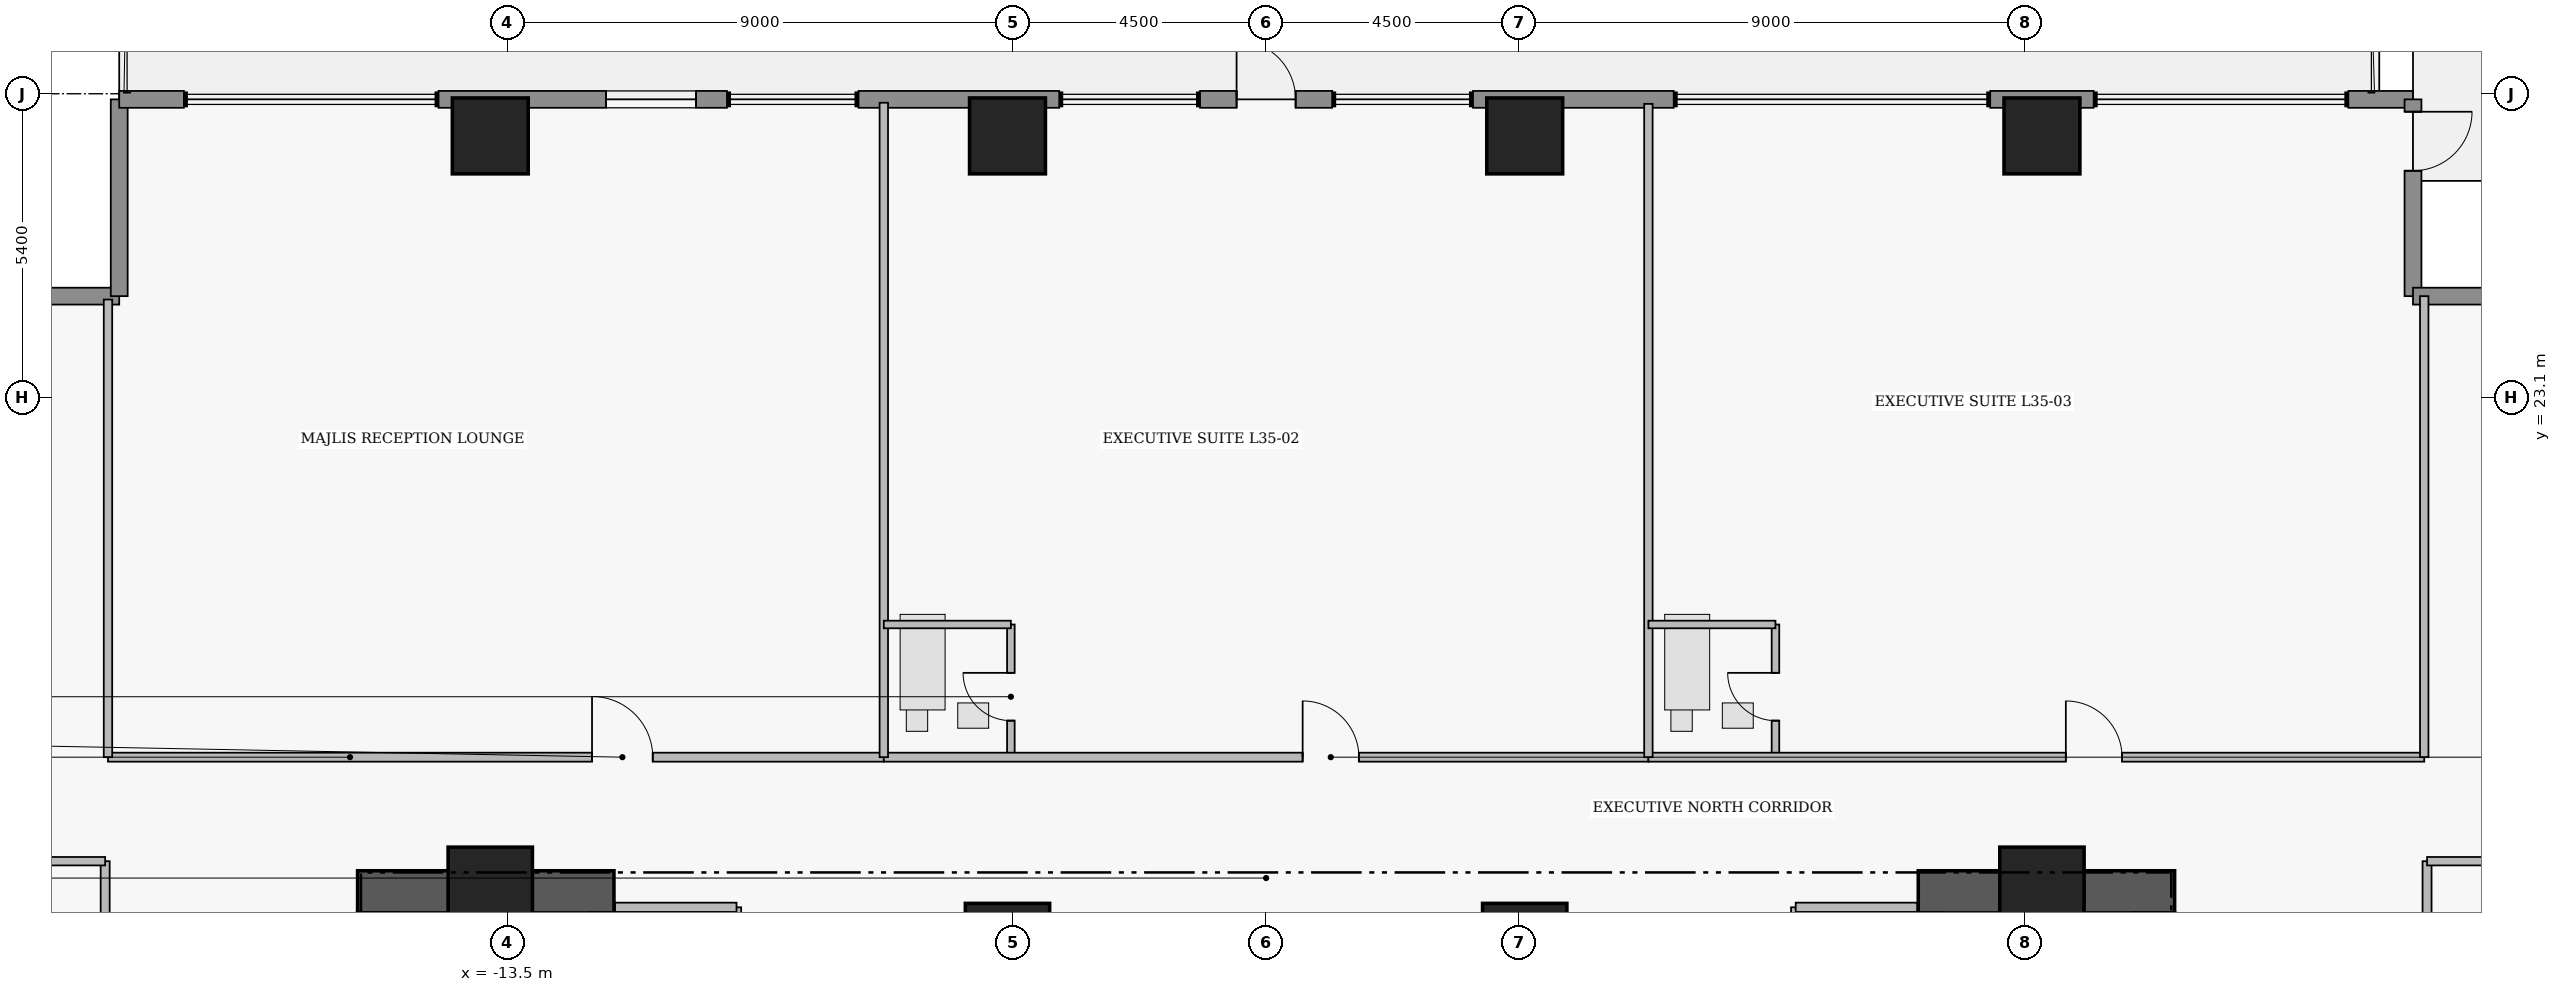
"""IFC4 building model, lengths in metres.
Left out: names, types, materials, properties, quantities, classifications, styles, units other than length and angle.
Written with IfcOpenShell. Run it as: python <this file> out.ifc"""

import sys

from ifc_helpers import new_model, si_unit, direction, frame, frame_2d, origin, origin_2d, place, context, subcontext, project, spatial, rectangle, extrude, element, fill, save


model = new_model("IFC4")
c1 = context("Model", 3, precision=1e-05, world=origin(), true_north=direction((0.0, 1.0)))
c2 = subcontext(c1, "Body", "Model", "MODEL_VIEW")
j1 = project(units=[si_unit("LENGTHUNIT", "METRE"), si_unit("PLANEANGLEUNIT", "RADIAN")], contexts=[c1])
p1 = place(None, origin())
s1 = spatial("IfcSite", under=j1, at=p1, CompositionType="ELEMENT")
p2 = place(p1, origin())
s2 = spatial("IfcBuilding", under=s1, at=p2, CompositionType="ELEMENT")
p3 = place(p2, frame((0.0, 0.0, 139.45)))
s3 = spatial("IfcBuildingStorey", under=s2, at=p3, CompositionType="ELEMENT", Elevation=139.45)
for number, where, z_axis, x_axis in (
    (1, (-16.16, 14.305, 0.0), (0.0, 0.0, 1.0), (1.0, 0.0, 0.0)),
    (2, (11.6, 14.305, 0.0), (0.0, 0.0, 1.0), (1.0, 0.0, 0.0)),
):
    element("IfcWall", number, at=place(p3, frame(where, z_axis=z_axis, x_axis=x_axis)), inside=s3, PredefinedType="SHEAR", context=c2, shape_type="SweptSolid", body=[
        extrude(rectangle(XDim=4.56, YDim=0.75, at=frame_2d((2.28, 0.0))), origin(), (0.0, 0.0, 1.0), 3.46),
    ])
for number, where, z_axis, x_axis in (
    (3, (-13.8, 14.35, 0.0), (0.0, 0.0, 1.0), (1.0, 0.0, 0.0)),
    (4, (-4.6, 13.35, 0.0), (0.0, 0.0, 1.0), (1.0, 0.0, 0.0)),
    (5, (4.6, 13.35, 0.0), (0.0, 0.0, 1.0), (1.0, 0.0, 0.0)),
    (6, (13.8, 14.35, 0.0), (0.0, 0.0, 1.0), (1.0, 0.0, 0.0)),
):
    element("IfcColumn", number, at=place(p3, frame(where, z_axis=z_axis, x_axis=x_axis)), inside=s3, PredefinedType="COLUMN", context=c2, shape_type="SweptSolid", body=[
        extrude(rectangle(XDim=1.5, YDim=1.5, at=origin_2d()), origin(), (0.0, 0.0, 1.0), 3.65),
    ])
for number, where, z_axis, x_axis in (
    (7, (-13.8, 27.75, 0.0), (0.0, 0.0, 1.0), (1.0, 0.0, 0.0)),
    (8, (-4.6, 27.75, 0.0), (0.0, 0.0, 1.0), (1.0, 0.0, 0.0)),
    (9, (4.6, 27.75, 0.0), (0.0, 0.0, 1.0), (1.0, 0.0, 0.0)),
    (10, (13.8, 27.75, 0.0), (0.0, 0.0, 1.0), (1.0, 0.0, 0.0)),
):
    element("IfcColumn", number, at=place(p3, frame(where, z_axis=z_axis, x_axis=x_axis)), inside=s3, PredefinedType="COLUMN", context=c2, shape_type="SweptSolid", body=[
        extrude(rectangle(XDim=1.35, YDim=1.35, at=origin_2d()), origin(), (0.0, 0.0, 1.0), 3.65),
    ])
for number, where, z_axis, x_axis in (
    (11, (-23.9, 24.9, 0.0), (0.0, 0.0, 1.0), (1.0, 0.0, 0.0)),
    (12, (-20.4, 24.9, 0.0), (0.0, 0.0, 1.0), (0.0, 1.0, 0.0)),
):
    element("IfcWall", number, at=place(p3, frame(where, z_axis=z_axis, x_axis=x_axis)), inside=s3, PredefinedType="STANDARD", context=c2, shape_type="SweptSolid", body=[
        extrude(rectangle(XDim=3.5, YDim=0.3, at=frame_2d((1.75, 0.0))), origin(), (0.0, 0.0, 1.0), 3.43),
    ])
p4 = place(p3, frame((-20.4, 28.4, 0.0), z_axis=(0.0, 0.0, 1.0), x_axis=(1.0, 0.0, 0.0)))
e13 = element("IfcWall", 13, at=p4, inside=s3, PredefinedType="STANDARD", context=c2, shape_type="SweptSolid", body=[
    extrude(rectangle(XDim=1.15, YDim=0.3, at=frame_2d((0.575, 0.0))), origin(), (0.0, 0.0, 1.0), 3.43),
])
p5 = place(p3, frame((-14.72, 28.4, 0.0), z_axis=(0.0, 0.0, 1.0), x_axis=(1.0, 0.0, 0.0)))
e14 = element("IfcWall", 14, at=p5, inside=s3, PredefinedType="STANDARD", context=c2, shape_type="SweptSolid", body=[
    extrude(rectangle(XDim=5.13, YDim=0.3, at=frame_2d((2.565, 0.0))), origin(), (0.0, 0.0, 1.0), 3.43),
])
p6 = place(p5, frame((2.98, 0.0, 0.85)))
e15 = element("IfcOpeningElement", 15, at=p6, cuts=e14, PredefinedType="OPENING", context=c2, shape_type="SweptSolid", body=[
    extrude(rectangle(XDim=1.6, YDim=1.8, at=frame_2d((0.8, 0.9))), frame((0.0, 0.16, 0.0), z_axis=(0.0, -1.0, 0.0), x_axis=(1.0, 0.0, 0.0)), (0.0, 0.0, 1.0), 0.32),
])
p7 = place(p3, frame((-7.25, 28.4, 0.0), z_axis=(0.0, 0.0, 1.0), x_axis=(1.0, 0.0, 0.0)))
e16 = element("IfcWall", 16, at=p7, inside=s3, PredefinedType="STANDARD", context=c2, shape_type="SweptSolid", body=[
    extrude(rectangle(XDim=3.57, YDim=0.3, at=frame_2d((1.785, 0.0))), origin(), (0.0, 0.0, 1.0), 3.43),
])
p8 = place(p3, frame((-1.175, 28.4, 0.0), z_axis=(0.0, 0.0, 1.0), x_axis=(1.0, 0.0, 0.0)))
e17 = element("IfcWall", 17, at=p8, inside=s3, PredefinedType="STANDARD", context=c2, shape_type="SweptSolid", body=[
    extrude(rectangle(XDim=2.35, YDim=0.3, at=frame_2d((1.175, 0.0))), origin(), (0.0, 0.0, 1.0), 3.43),
])
p9 = place(p8, frame((0.65, 0.0, 0.0)))
e18 = element("IfcOpeningElement", 18, at=p9, cuts=e17, PredefinedType="OPENING", context=c2, shape_type="SweptSolid", body=[
    extrude(rectangle(XDim=1.05, YDim=2.2, at=frame_2d((0.525, 1.1))), frame((0.0, 0.16, 0.0), z_axis=(0.0, -1.0, 0.0), x_axis=(1.0, 0.0, 0.0)), (0.0, 0.0, 1.0), 0.32),
])
p10 = place(p3, frame((3.68, 28.4, 0.0), z_axis=(0.0, 0.0, 1.0), x_axis=(1.0, 0.0, 0.0)))
e19 = element("IfcWall", 19, at=p10, inside=s3, PredefinedType="STANDARD", context=c2, shape_type="SweptSolid", body=[
    extrude(rectangle(XDim=3.57, YDim=0.3, at=frame_2d((1.785, 0.0))), origin(), (0.0, 0.0, 1.0), 3.43),
])
p11 = place(p3, frame((12.88, 28.4, 0.0), z_axis=(0.0, 0.0, 1.0), x_axis=(1.0, 0.0, 0.0)))
e20 = element("IfcWall", 20, at=p11, inside=s3, PredefinedType="STANDARD", context=c2, shape_type="SweptSolid", body=[
    extrude(rectangle(XDim=1.84, YDim=0.3, at=frame_2d((0.92, 0.0))), origin(), (0.0, 0.0, 1.0), 3.43),
])
p12 = place(p3, frame((19.25, 28.4, 0.0), z_axis=(0.0, 0.0, 1.0), x_axis=(1.0, 0.0, 0.0)))
e21 = element("IfcWall", 21, at=p12, inside=s3, PredefinedType="STANDARD", context=c2, shape_type="SweptSolid", body=[
    extrude(rectangle(XDim=1.15, YDim=0.3, at=frame_2d((0.575, 0.0))), origin(), (0.0, 0.0, 1.0), 3.43),
])
p13 = place(p3, frame((20.4, 28.4, 0.0), z_axis=(0.0, 0.0, 1.0), x_axis=(0.0, -1.0, 0.0)))
e22 = element("IfcWall", 22, at=p13, inside=s3, PredefinedType="STANDARD", context=c2, shape_type="SweptSolid", body=[
    extrude(rectangle(XDim=3.5, YDim=0.3, at=frame_2d((1.75, 0.0))), origin(), (0.0, 0.0, 1.0), 3.43),
])
p14 = place(p13, frame((0.22, 0.0, 0.0)))
e23 = element("IfcOpeningElement", 23, at=p14, cuts=e22, PredefinedType="OPENING", context=c2, shape_type="SweptSolid", body=[
    extrude(rectangle(XDim=1.05, YDim=2.2, at=frame_2d((0.525, 1.1))), frame((0.0, 0.16, 0.0), z_axis=(0.0, -1.0, 0.0), x_axis=(1.0, 0.0, 0.0)), (0.0, 0.0, 1.0), 0.32),
])
p15 = place(p3, frame((20.4, 24.9, 0.0), z_axis=(0.0, 0.0, 1.0), x_axis=(1.0, 0.0, 0.0)))
e24 = element("IfcWall", 24, at=p15, inside=s3, PredefinedType="STANDARD", context=c2, shape_type="SweptSolid", body=[
    extrude(rectangle(XDim=3.5, YDim=0.3, at=frame_2d((1.75, 0.0))), origin(), (0.0, 0.0, 1.0), 3.43),
])
p16 = place(p3, frame((-20.6, 16.7, 0.0), z_axis=(0.0, 0.0, 1.0), x_axis=(1.0, 0.0, 0.0)))
e25 = element("IfcWall", 25, at=p16, inside=s3, PredefinedType="PARTITIONING", context=c2, shape_type="SweptSolid", body=[
    extrude(rectangle(XDim=13.8, YDim=0.16, at=frame_2d((6.9, 0.0))), origin(), (0.0, 0.0, 1.0), 2.973),
])
p17 = place(p16, frame((8.61, 0.0, 0.0)))
e26 = element("IfcOpeningElement", 26, at=p17, cuts=e25, PredefinedType="OPENING", context=c2, shape_type="SweptSolid", body=[
    extrude(rectangle(XDim=1.08, YDim=2.18, at=frame_2d((0.54, 1.09))), frame((0.0, 0.09, 0.0), z_axis=(0.0, -1.0, 0.0), x_axis=(1.0, 0.0, 0.0)), (0.0, 0.0, 1.0), 0.18),
])
p18 = place(p3, frame((-4.54, 16.7, 0.0), z_axis=(0.0, 0.0, 1.0), x_axis=(0.0, 1.0, 0.0)))
e27 = element("IfcWall", 27, at=p18, inside=s3, PredefinedType="PLUMBINGWALL", context=c2, shape_type="SweptSolid", body=[
    extrude(rectangle(XDim=2.36, YDim=0.135, at=frame_2d((1.18, 0.0))), origin(), (0.0, 0.0, 1.0), 2.503),
])
p19 = place(p18, frame((0.65, 0.0, 0.0)))
e28 = element("IfcOpeningElement", 28, at=p19, cuts=e27, PredefinedType="OPENING", context=c2, shape_type="SweptSolid", body=[
    extrude(rectangle(XDim=0.85, YDim=2.1, at=frame_2d((0.425, 1.05))), frame((0.0, 0.077, 0.0), z_axis=(0.0, -1.0, 0.0), x_axis=(1.0, 0.0, 0.0)), (0.0, 0.0, 1.0), 0.155),
])
p20 = place(p3, frame((-6.8, 16.7, 0.0), z_axis=(0.0, 0.0, 1.0), x_axis=(1.0, 0.0, 0.0)))
e29 = element("IfcWall", 29, at=p20, inside=s3, PredefinedType="PARTITIONING", context=c2, shape_type="SweptSolid", body=[
    extrude(rectangle(XDim=13.6, YDim=0.16, at=frame_2d((6.8, 0.0))), origin(), (0.0, 0.0, 1.0), 2.973),
])
p21 = place(p20, frame((7.45, 0.0, 0.0)))
e30 = element("IfcOpeningElement", 30, at=p21, cuts=e29, PredefinedType="OPENING", context=c2, shape_type="SweptSolid", body=[
    extrude(rectangle(XDim=1.0, YDim=2.15, at=frame_2d((0.5, 1.075))), frame((0.0, 0.09, 0.0), z_axis=(0.0, -1.0, 0.0), x_axis=(1.0, 0.0, 0.0)), (0.0, 0.0, 1.0), 0.18),
])
p22 = place(p3, frame((9.06, 16.7, 0.0), z_axis=(0.0, 0.0, 1.0), x_axis=(0.0, 1.0, 0.0)))
e31 = element("IfcWall", 31, at=p22, inside=s3, PredefinedType="PLUMBINGWALL", context=c2, shape_type="SweptSolid", body=[
    extrude(rectangle(XDim=2.36, YDim=0.135, at=frame_2d((1.18, 0.0))), origin(), (0.0, 0.0, 1.0), 3.43),
])
p23 = place(p22, frame((0.65, 0.0, 0.0)))
e32 = element("IfcOpeningElement", 32, at=p23, cuts=e31, PredefinedType="OPENING", context=c2, shape_type="SweptSolid", body=[
    extrude(rectangle(XDim=0.85, YDim=2.1, at=frame_2d((0.425, 1.05))), frame((0.0, 0.077, 0.0), z_axis=(0.0, -1.0, 0.0), x_axis=(1.0, 0.0, 0.0)), (0.0, 0.0, 1.0), 0.155),
])
p24 = place(p3, frame((6.8, 16.7, 0.0), z_axis=(0.0, 0.0, 1.0), x_axis=(1.0, 0.0, 0.0)))
e33 = element("IfcWall", 33, at=p24, inside=s3, PredefinedType="PARTITIONING", context=c2, shape_type="SweptSolid", body=[
    extrude(rectangle(XDim=13.8, YDim=0.16, at=frame_2d((6.9, 0.0))), origin(), (0.0, 0.0, 1.0), 2.973),
])
p25 = place(p24, frame((7.425, 0.0, 0.0)))
e34 = element("IfcOpeningElement", 34, at=p25, cuts=e33, PredefinedType="OPENING", context=c2, shape_type="SweptSolid", body=[
    extrude(rectangle(XDim=1.0, YDim=2.15, at=frame_2d((0.5, 1.075))), frame((0.0, 0.09, 0.0), z_axis=(0.0, -1.0, 0.0), x_axis=(1.0, 0.0, 0.0)), (0.0, 0.0, 1.0), 0.18),
])
p26 = place(p3, frame((20.65, 6.91, 0.0), z_axis=(0.0, 0.0, 1.0), x_axis=(0.0, 1.0, 0.0)))
e35 = element("IfcWall", 35, at=p26, inside=s3, PredefinedType="PARTITIONING", context=c2, shape_type="SweptSolid", body=[
    extrude(rectangle(XDim=7.94, YDim=0.16, at=frame_2d((3.97, 0.0))), origin(), (0.0, 0.0, 1.0), 3.43),
])
p27 = place(p26, frame((3.51, 0.0, 0.0)))
e36 = element("IfcOpeningElement", 36, at=p27, cuts=e35, PredefinedType="OPENING", context=c2, shape_type="SweptSolid", body=[
    extrude(rectangle(XDim=0.92, YDim=2.12, at=frame_2d((0.46, 1.06))), frame((0.0, 0.09, 0.0), z_axis=(0.0, -1.0, 0.0), x_axis=(1.0, 0.0, 0.0)), (0.0, 0.0, 1.0), 0.18),
])
p28 = place(p3, frame((-20.65, 1.55, 0.0), z_axis=(0.0, 0.0, 1.0), x_axis=(0.0, 1.0, 0.0)))
e37 = element("IfcWall", 37, at=p28, inside=s3, PredefinedType="PARTITIONING", context=c2, shape_type="SweptSolid", body=[
    extrude(rectangle(XDim=13.3, YDim=0.16, at=frame_2d((6.65, 0.0))), origin(), (0.0, 0.0, 1.0), 3.43),
])
p29 = place(p28, frame((6.175, 0.0, 0.0)))
e38 = element("IfcOpeningElement", 38, at=p29, cuts=e37, PredefinedType="OPENING", context=c2, shape_type="SweptSolid", body=[
    extrude(rectangle(XDim=0.95, YDim=2.15, at=frame_2d((0.475, 1.075))), frame((0.0, 0.09, 0.0), z_axis=(0.0, -1.0, 0.0), x_axis=(1.0, 0.0, 0.0)), (0.0, 0.0, 1.0), 0.18),
])
p30 = place(p3, frame((-9.42, 11.07, 0.0), z_axis=(0.0, 0.0, 1.0), x_axis=(0.0, 1.0, 0.0)))
e39 = element("IfcWall", 39, at=p30, inside=s3, PredefinedType="PARTITIONING", context=c2, shape_type="SweptSolid", body=[
    extrude(rectangle(XDim=2.96, YDim=0.165, at=frame_2d((1.48, 0.0))), origin(), (0.0, 0.0, 1.0), 3.43),
])
p31 = place(p3, frame((-11.58, 14.03, 0.0), z_axis=(0.0, 0.0, 1.0), x_axis=(1.0, 0.0, 0.0)))
e40 = element("IfcWall", 40, at=p31, inside=s3, PredefinedType="PARTITIONING", context=c2, shape_type="SweptSolid", body=[
    extrude(rectangle(XDim=2.16, YDim=0.165, at=frame_2d((1.08, 0.0))), origin(), (0.0, 0.0, 1.0), 3.43),
])
p32 = place(p3, frame((9.42, 11.07, 0.0), z_axis=(0.0, 0.0, 1.0), x_axis=(0.0, 1.0, 0.0)))
e41 = element("IfcWall", 41, at=p32, inside=s3, PredefinedType="PARTITIONING", context=c2, shape_type="SweptSolid", body=[
    extrude(rectangle(XDim=2.96, YDim=0.165, at=frame_2d((1.48, 0.0))), origin(), (0.0, 0.0, 1.0), 3.43),
])
p33 = place(p3, frame((9.42, 14.03, 0.0), z_axis=(0.0, 0.0, 1.0), x_axis=(1.0, 0.0, 0.0)))
e42 = element("IfcWall", 42, at=p33, inside=s3, PredefinedType="PARTITIONING", context=c2, shape_type="SweptSolid", body=[
    extrude(rectangle(XDim=2.16, YDim=0.165, at=frame_2d((1.08, 0.0))), origin(), (0.0, 0.0, 1.0), 3.43),
])
p34 = place(p3, frame((-20.6, 16.7, 0.0), z_axis=(0.0, 0.0, 1.0), x_axis=(0.0, 1.0, 0.0)))
e43 = element("IfcWall", 43, at=p34, inside=s3, PredefinedType="PARTITIONING", context=c2, shape_type="SweptSolid", body=[
    extrude(rectangle(XDim=8.14, YDim=0.15, at=frame_2d((4.07, 0.0))), origin(), (0.0, 0.0, 1.0), 3.43),
])
p35 = place(p3, frame((-6.8, 16.7, 0.0), z_axis=(0.0, 0.0, 1.0), x_axis=(0.0, 1.0, 0.0)))
e44 = element("IfcWall", 44, at=p35, inside=s3, PredefinedType="PARTITIONING", context=c2, shape_type="SweptSolid", body=[
    extrude(rectangle(XDim=11.64, YDim=0.15, at=frame_2d((5.82, 0.0))), origin(), (0.0, 0.0, 1.0), 3.43),
])
p36 = place(p3, frame((-6.8, 19.06, 0.0), z_axis=(0.0, 0.0, 1.0), x_axis=(1.0, 0.0, 0.0)))
e45 = element("IfcWall", 45, at=p36, inside=s3, PredefinedType="PLUMBINGWALL", context=c2, shape_type="SweptSolid", body=[
    extrude(rectangle(XDim=2.26, YDim=0.135, at=frame_2d((1.13, 0.0))), origin(), (0.0, 0.0, 1.0), 2.973),
])
p37 = place(p3, frame((6.8, 16.7, 0.0), z_axis=(0.0, 0.0, 1.0), x_axis=(0.0, 1.0, 0.0)))
e46 = element("IfcWall", 46, at=p37, inside=s3, PredefinedType="PARTITIONING", context=c2, shape_type="SweptSolid", body=[
    extrude(rectangle(XDim=11.62, YDim=0.15, at=frame_2d((5.81, 0.0))), origin(), (0.0, 0.0, 1.0), 3.43),
])
p38 = place(p3, frame((6.8, 19.06, 0.0), z_axis=(0.0, 0.0, 1.0), x_axis=(1.0, 0.0, 0.0)))
e47 = element("IfcWall", 47, at=p38, inside=s3, PredefinedType="PLUMBINGWALL", context=c2, shape_type="SweptSolid", body=[
    extrude(rectangle(XDim=2.26, YDim=0.135, at=frame_2d((1.13, 0.0))), origin(), (0.0, 0.0, 1.0), 2.973),
])
p39 = place(p3, frame((20.6, 16.7, 0.0), z_axis=(0.0, 0.0, 1.0), x_axis=(0.0, 1.0, 0.0)))
e48 = element("IfcWall", 48, at=p39, inside=s3, PredefinedType="PARTITIONING", context=c2, shape_type="SweptSolid", body=[
    extrude(rectangle(XDim=8.2, YDim=0.15, at=frame_2d((4.1, 0.0))), origin(), (0.0, 0.0, 1.0), 3.43),
])
for number, where, z_axis, x_axis in (
    (49, (20.65, 14.85, 0.0), (0.0, 0.0, 1.0), (1.0, 0.0, 0.0)),
    (50, (-23.84, 14.85, 0.0), (0.0, 0.0, 1.0), (1.0, 0.0, 0.0)),
):
    element("IfcWall", number, at=place(p3, frame(where, z_axis=z_axis, x_axis=x_axis)), inside=s3, PredefinedType="PARTITIONING", context=c2, shape_type="SweptSolid", body=[
        extrude(rectangle(XDim=3.19, YDim=0.15, at=frame_2d((1.595, 0.0))), origin(), (0.0, 0.0, 1.0), 3.43),
    ])
p40 = place(p6, origin())
e51 = element("IfcWindow", 51, at=p40, inside=s3, PartitioningType="SINGLE_PANEL", PredefinedType="WINDOW", context=c2, shape_type="SweptSolid", body=[
    extrude(rectangle(XDim=1.6, YDim=1.8, at=frame_2d((0.8, 0.9))), frame((0.0, 0.03, 0.0), z_axis=(0.0, -1.0, 0.0), x_axis=(1.0, 0.0, 0.0)), (0.0, 0.0, 1.0), 0.06),
])
fill(e15, e51)
p41 = place(p9, origin())
e52 = element("IfcDoor", 52, at=p41, inside=s3, OperationType="SINGLE_SWING_LEFT", PredefinedType="DOOR", context=c2, shape_type="SweptSolid", body=[
    extrude(rectangle(XDim=1.05, YDim=2.2, at=frame_2d((0.525, 1.1))), frame((0.0, 0.025, 0.0), z_axis=(0.0, -1.0, 0.0), x_axis=(1.0, 0.0, 0.0)), (0.0, 0.0, 1.0), 0.05),
])
fill(e18, e52)
p42 = place(p14, origin())
e53 = element("IfcDoor", 53, at=p42, inside=s3, OperationType="SINGLE_SWING_LEFT", PredefinedType="DOOR", context=c2, shape_type="SweptSolid", body=[
    extrude(rectangle(XDim=1.05, YDim=2.2, at=frame_2d((0.525, 1.1))), frame((0.0, 0.025, 0.0), z_axis=(0.0, -1.0, 0.0), x_axis=(1.0, 0.0, 0.0)), (0.0, 0.0, 1.0), 0.05),
])
fill(e23, e53)
p43 = place(p17, origin())
e54 = element("IfcDoor", 54, at=p43, inside=s3, OperationType="SINGLE_SWING_LEFT", PredefinedType="DOOR", context=c2, shape_type="SweptSolid", body=[
    extrude(rectangle(XDim=1.08, YDim=2.18, at=frame_2d((0.54, 1.09))), frame((0.0, 0.025, 0.0), z_axis=(0.0, -1.0, 0.0), x_axis=(1.0, 0.0, 0.0)), (0.0, 0.0, 1.0), 0.05),
])
fill(e26, e54)
p44 = place(p19, origin())
e55 = element("IfcDoor", 55, at=p44, inside=s3, OperationType="SINGLE_SWING_RIGHT", PredefinedType="DOOR", context=c2, shape_type="SweptSolid", body=[
    extrude(rectangle(XDim=0.85, YDim=2.1, at=frame_2d((0.425, 1.05))), frame((0.0, 0.025, 0.0), z_axis=(0.0, -1.0, 0.0), x_axis=(1.0, 0.0, 0.0)), (0.0, 0.0, 1.0), 0.05),
])
fill(e28, e55)
p45 = place(p21, origin())
e56 = element("IfcDoor", 56, at=p45, inside=s3, OperationType="SINGLE_SWING_LEFT", PredefinedType="DOOR", context=c2, shape_type="SweptSolid", body=[
    extrude(rectangle(XDim=1.0, YDim=2.15, at=frame_2d((0.5, 1.075))), frame((0.0, 0.025, 0.0), z_axis=(0.0, -1.0, 0.0), x_axis=(1.0, 0.0, 0.0)), (0.0, 0.0, 1.0), 0.05),
])
fill(e30, e56)
p46 = place(p23, origin())
e57 = element("IfcDoor", 57, at=p46, inside=s3, OperationType="SINGLE_SWING_RIGHT", PredefinedType="DOOR", context=c2, shape_type="SweptSolid", body=[
    extrude(rectangle(XDim=0.85, YDim=2.1, at=frame_2d((0.425, 1.05))), frame((0.0, 0.025, 0.0), z_axis=(0.0, -1.0, 0.0), x_axis=(1.0, 0.0, 0.0)), (0.0, 0.0, 1.0), 0.05),
])
fill(e32, e57)
p47 = place(p25, origin())
e58 = element("IfcDoor", 58, at=p47, inside=s3, OperationType="SINGLE_SWING_LEFT", PredefinedType="DOOR", context=c2, shape_type="SweptSolid", body=[
    extrude(rectangle(XDim=1.0, YDim=2.15, at=frame_2d((0.5, 1.075))), frame((0.0, 0.025, 0.0), z_axis=(0.0, -1.0, 0.0), x_axis=(1.0, 0.0, 0.0)), (0.0, 0.0, 1.0), 0.05),
])
fill(e34, e58)
save(model, sys.argv[1])
